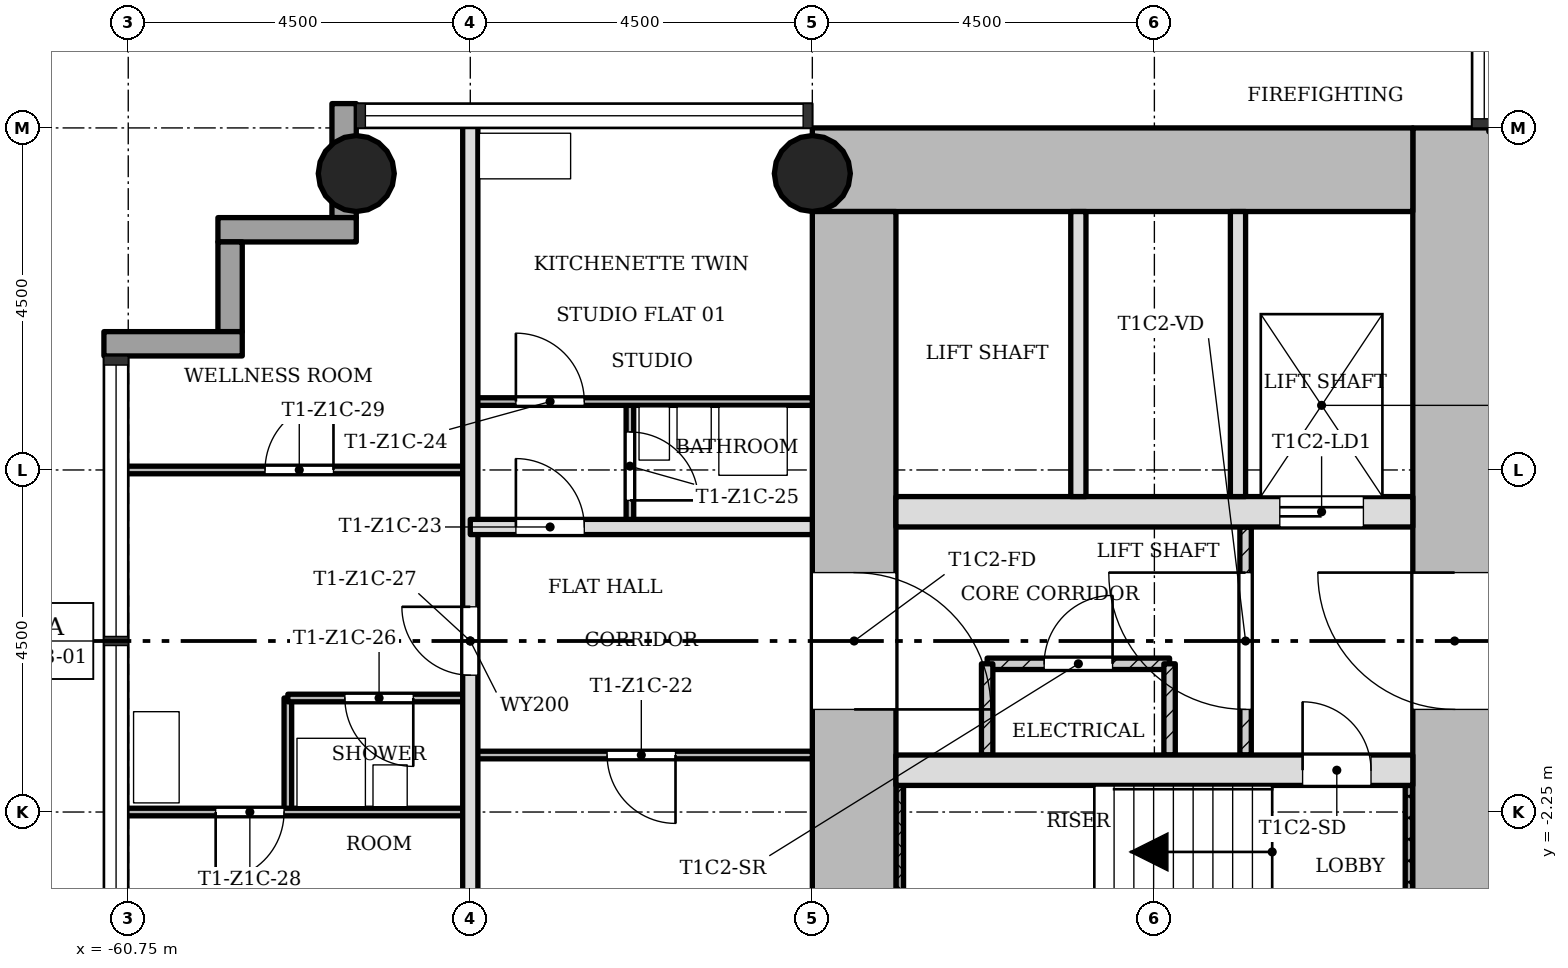
"""IFC4 building model, lengths in metres.
Left out: names, types, materials, properties, quantities, classifications, styles, units other than length and angle.
Written with IfcOpenShell. Run it as: python <this file> out.ifc"""

import sys

from ifc_helpers import new_model, si_unit, direction, frame, frame_2d, origin, origin_2d, place, context, subcontext, project, spatial, rectangle, hollow_circle, extrude, element, fill, save


model = new_model("IFC4")
c1 = context("Model", 3, precision=1e-05, world=origin(), true_north=direction((0.0, 1.0)))
c2 = subcontext(c1, "Body", "Model", "MODEL_VIEW")
j1 = project(units=[si_unit("LENGTHUNIT", "METRE"), si_unit("PLANEANGLEUNIT", "RADIAN")], contexts=[c1])
p1 = place(None, origin())
s1 = spatial("IfcSite", under=j1, at=p1, CompositionType="ELEMENT")
p2 = place(p1, origin())
s2 = spatial("IfcBuilding", under=s1, at=p2, CompositionType="ELEMENT")
p3 = place(p2, frame((0.0, 0.0, 48.3)))
s3 = spatial("IfcBuildingStorey", under=s2, at=p3, CompositionType="ELEMENT", Elevation=48.3)
p4 = place(p3, frame((-43.3, -5.65, 0.0), z_axis=(0.0, 0.0, 1.0), x_axis=(0.0, 1.0, 0.0)))
e1 = element("IfcWall", 1, at=p4, inside=s3, PredefinedType="SHEAR", context=c2, shape_type="SweptSolid", body=[
    extrude(rectangle(XDim=12.4, YDim=1.1, at=frame_2d((6.2, 0.0))), origin(), (0.0, 0.0, 1.0), 3.4),
])
p5 = place(p4, frame((4.75, 0.0, 0.0)))
e2 = element("IfcOpeningElement", 2, at=p5, cuts=e1, PredefinedType="OPENING", context=c2, shape_type="SweptSolid", body=[
    extrude(rectangle(XDim=1.8, YDim=2.1, at=frame_2d((0.9, 1.05))), frame((0.0, 0.56, 0.0), z_axis=(0.0, -1.0, 0.0), x_axis=(1.0, 0.0, 0.0)), (0.0, 0.0, 1.0), 1.12),
])
p6 = place(p3, frame((-43.85, 6.2, 0.0), z_axis=(0.0, 0.0, 1.0), x_axis=(-1.0, 0.0, 0.0)))
e3 = element("IfcWall", 3, at=p6, inside=s3, PredefinedType="SHEAR", context=c2, shape_type="SweptSolid", body=[
    extrude(rectangle(XDim=7.9, YDim=1.1, at=frame_2d((3.95, 0.0))), origin(), (0.0, 0.0, 1.0), 3.4),
])
p7 = place(p3, frame((-51.2, 5.65, 0.0), z_axis=(0.0, 0.0, 1.0), x_axis=(0.0, -1.0, 0.0)))
e4 = element("IfcWall", 4, at=p7, inside=s3, PredefinedType="SHEAR", context=c2, shape_type="SweptSolid", body=[
    extrude(rectangle(XDim=12.4, YDim=1.1, at=frame_2d((6.2, 0.0))), origin(), (0.0, 0.0, 1.0), 3.4),
])
p8 = place(p7, frame((4.75, 0.0, 0.0)))
e5 = element("IfcOpeningElement", 5, at=p8, cuts=e4, PredefinedType="OPENING", context=c2, shape_type="SweptSolid", body=[
    extrude(rectangle(XDim=1.8, YDim=2.1, at=frame_2d((0.9, 1.05))), frame((0.0, 0.56, 0.0), z_axis=(0.0, -1.0, 0.0), x_axis=(1.0, 0.0, 0.0)), (0.0, 0.0, 1.0), 1.12),
])
p9 = place(p3, frame((-50.65, -1.7, 0.0), z_axis=(0.0, 0.0, 1.0), x_axis=(1.0, 0.0, 0.0)))
e6 = element("IfcWall", 6, at=p9, inside=s3, PredefinedType="SHEAR", context=c2, shape_type="SweptSolid", body=[
    extrude(rectangle(XDim=6.8, YDim=0.4, at=frame_2d((3.4, 0.0))), origin(), (0.0, 0.0, 1.0), 3.4),
])
p10 = place(p9, frame((5.35, 0.0, 0.0)))
e7 = element("IfcOpeningElement", 7, at=p10, cuts=e6, PredefinedType="OPENING", context=c2, shape_type="SweptSolid", body=[
    extrude(rectangle(XDim=0.9, YDim=2.1, at=frame_2d((0.45, 1.05))), frame((0.0, 0.21, 0.0), z_axis=(0.0, -1.0, 0.0), x_axis=(1.0, 0.0, 0.0)), (0.0, 0.0, 1.0), 0.42),
])
p11 = place(p3, frame((-50.65, 1.7, 0.0), z_axis=(0.0, 0.0, 1.0), x_axis=(1.0, 0.0, 0.0)))
e8 = element("IfcWall", 8, at=p11, inside=s3, PredefinedType="SHEAR", context=c2, shape_type="SweptSolid", body=[
    extrude(rectangle(XDim=6.8, YDim=0.4, at=frame_2d((3.4, 0.0))), origin(), (0.0, 0.0, 1.0), 3.4),
])
p12 = place(p11, frame((5.05, 0.0, 0.0)))
e9 = element("IfcOpeningElement", 9, at=p12, cuts=e8, PredefinedType="OPENING", context=c2, shape_type="SweptSolid", body=[
    extrude(rectangle(XDim=1.1, YDim=2.1, at=frame_2d((0.55, 1.05))), frame((0.0, 0.21, 0.0), z_axis=(0.0, -1.0, 0.0), x_axis=(1.0, 0.0, 0.0)), (0.0, 0.0, 1.0), 0.42),
])
for number, where, z_axis, x_axis in (
    (10, (-51.75, 6.15, 0.0), (0.0, 0.0, 1.0), (1.0, 0.0, 0.0)),
    (11, (-57.75, 6.15, 0.0), (0.0, 0.0, 1.0), (1.0, 0.0, 0.0)),
):
    element("IfcColumn", number, at=place(p3, frame(where, z_axis=z_axis, x_axis=x_axis)), inside=s3, PredefinedType="COLUMN", context=c2, shape_type="SweptSolid", body=[
        extrude(hollow_circle(Radius=0.5, WallThickness=0.036, at=origin_2d()), origin(), (0.0, 0.0, 1.0), 3.4),
    ])
p13 = place(p3, frame((-57.91, 7.07, -0.3), z_axis=(0.0, 0.0, 1.0), x_axis=(0.0, -1.0, 0.0)))
e12 = element("IfcWall", 12, at=p13, inside=s3, PredefinedType="STANDARD", context=c2, shape_type="SweptSolid", body=[
    extrude(rectangle(XDim=1.5, YDim=0.32, at=frame_2d((0.75, 0.0))), origin(), (0.0, 0.0, 1.0), 3.4),
])
p14 = place(p3, frame((-57.75, 5.41, -0.3), z_axis=(0.0, 0.0, 1.0), x_axis=(-1.0, 0.0, 0.0)))
e13 = element("IfcWall", 13, at=p14, inside=s3, PredefinedType="STANDARD", context=c2, shape_type="SweptSolid", body=[
    extrude(rectangle(XDim=1.82, YDim=0.32, at=frame_2d((0.91, 0.0))), origin(), (0.0, 0.0, 1.0), 3.4),
])
p15 = place(p3, frame((-59.41, 5.25, -0.3), z_axis=(0.0, 0.0, 1.0), x_axis=(0.0, -1.0, 0.0)))
e14 = element("IfcWall", 14, at=p15, inside=s3, PredefinedType="STANDARD", context=c2, shape_type="SweptSolid", body=[
    extrude(rectangle(XDim=1.18, YDim=0.32, at=frame_2d((0.59, 0.0))), origin(), (0.0, 0.0, 1.0), 3.4),
])
p16 = place(p3, frame((-59.25, 3.91, -0.3), z_axis=(0.0, 0.0, 1.0), x_axis=(-1.0, 0.0, 0.0)))
e15 = element("IfcWall", 15, at=p16, inside=s3, PredefinedType="STANDARD", context=c2, shape_type="SweptSolid", body=[
    extrude(rectangle(XDim=1.82, YDim=0.32, at=frame_2d((0.91, 0.0))), origin(), (0.0, 0.0, 1.0), 3.4),
])
p17 = place(p3, frame((-46.05, 1.5, 0.0), z_axis=(0.0, 0.0, 1.0), x_axis=(0.0, -1.0, 0.0)))
e16 = element("IfcWall", 16, at=p17, inside=s3, PredefinedType="PARTITIONING", context=c2, shape_type="SweptSolid", body=[
    extrude(rectangle(XDim=3.0, YDim=0.15, at=frame_2d((1.5, 0.0))), origin(), (0.0, 0.0, 1.0), 3.0),
])
p18 = place(p17, frame((0.6, 0.0, 0.0)))
e17 = element("IfcOpeningElement", 17, at=p18, cuts=e16, PredefinedType="OPENING", context=c2, shape_type="SweptSolid", body=[
    extrude(rectangle(XDim=1.8, YDim=2.1, at=frame_2d((0.9, 1.05))), frame((0.0, 0.085, 0.0), z_axis=(0.0, -1.0, 0.0), x_axis=(1.0, 0.0, 0.0)), (0.0, 0.0, 1.0), 0.17),
])
for number, where, z_axis, x_axis in (
    (18, (-46.15, 5.65, 0.0), (0.0, 0.0, 1.0), (0.0, -1.0, 0.0)),
    (19, (-48.25, 5.65, 0.0), (0.0, 0.0, 1.0), (0.0, -1.0, 0.0)),
):
    element("IfcWall", number, at=place(p3, frame(where, z_axis=z_axis, x_axis=x_axis)), inside=s3, PredefinedType="SOLIDWALL", context=c2, shape_type="SweptSolid", body=[
        extrude(rectangle(XDim=3.75, YDim=0.2, at=frame_2d((1.875, 0.0))), origin(), (0.0, 0.0, 1.0), 3.0),
    ])
p19 = place(p3, frame((-47.05, -0.3, 0.0), z_axis=(0.0, 0.0, 1.0), x_axis=(-1.0, 0.0, 0.0)))
e20 = element("IfcWall", 20, at=p19, inside=s3, PredefinedType="PARTITIONING", context=c2, shape_type="SweptSolid", body=[
    extrude(rectangle(XDim=2.4, YDim=0.15, at=frame_2d((1.2, 0.0))), origin(), (0.0, 0.0, 1.0), 3.0),
])
p20 = place(p19, frame((0.75, 0.0, 0.0)))
e21 = element("IfcOpeningElement", 21, at=p20, cuts=e20, PredefinedType="OPENING", context=c2, shape_type="SweptSolid", body=[
    extrude(rectangle(XDim=0.9, YDim=2.1, at=frame_2d((0.45, 1.05))), frame((0.0, 0.085, 0.0), z_axis=(0.0, -1.0, 0.0), x_axis=(1.0, 0.0, 0.0)), (0.0, 0.0, 1.0), 0.17),
])
for number, where, z_axis, x_axis in (
    (22, (-47.05, -0.3, 0.0), (0.0, 0.0, 1.0), (0.0, -1.0, 0.0)),
    (23, (-49.45, -0.3, 0.0), (0.0, 0.0, 1.0), (0.0, -1.0, 0.0)),
):
    element("IfcWall", number, at=place(p3, frame(where, z_axis=z_axis, x_axis=x_axis)), inside=s3, PredefinedType="PARTITIONING", context=c2, shape_type="SweptSolid", body=[
        extrude(rectangle(XDim=1.2, YDim=0.15, at=frame_2d((0.6, 0.0))), origin(), (0.0, 0.0, 1.0), 3.0),
    ])
p21 = place(p3, frame((-58.65, -2.25, 0.0), z_axis=(0.0, 0.0, 1.0), x_axis=(0.0, 1.0, 0.0)))
e24 = element("IfcWall", 24, at=p21, inside=s3, PredefinedType="PARTITIONING", context=c2, shape_type="SweptSolid", body=[
    extrude(rectangle(XDim=1.5, YDim=0.1, at=frame_2d((0.75, 0.0))), origin(), (0.0, 0.0, 1.0), 3.0),
])
p22 = place(p3, frame((-56.25, -6.85, 0.0), z_axis=(0.0, 0.0, 1.0), x_axis=(0.0, 1.0, 0.0)))
e25 = element("IfcWall", 25, at=p22, inside=s3, PredefinedType="SOLIDWALL", context=c2, shape_type="SweptSolid", body=[
    extrude(rectangle(XDim=13.7, YDim=0.2, at=frame_2d((6.85, 0.0))), origin(), (0.0, 0.0, 1.0), 3.0),
])
p23 = place(p22, frame((6.4, 0.0, 0.0)))
e26 = element("IfcOpeningElement", 26, at=p23, cuts=e25, PredefinedType="OPENING", context=c2, shape_type="SweptSolid", body=[
    extrude(rectangle(XDim=0.9, YDim=2.1, at=frame_2d((0.45, 1.05))), frame((0.0, 0.11, 0.0), z_axis=(0.0, -1.0, 0.0), x_axis=(1.0, 0.0, 0.0)), (0.0, 0.0, 1.0), 0.22),
])
p24 = place(p3, frame((-54.15, 1.5, 0.0), z_axis=(0.0, 0.0, 1.0), x_axis=(0.0, 1.0, 0.0)))
e27 = element("IfcWall", 27, at=p24, inside=s3, PredefinedType="PARTITIONING", context=c2, shape_type="SweptSolid", body=[
    extrude(rectangle(XDim=1.65, YDim=0.1, at=frame_2d((0.825, 0.0))), origin(), (0.0, 0.0, 1.0), 3.0),
])
p25 = place(p24, frame((0.35, 0.0, 0.0)))
e28 = element("IfcOpeningElement", 28, at=p25, cuts=e27, PredefinedType="OPENING", context=c2, shape_type="SweptSolid", body=[
    extrude(rectangle(XDim=0.9, YDim=2.1, at=frame_2d((0.45, 1.05))), frame((0.0, 0.06, 0.0), z_axis=(0.0, -1.0, 0.0), x_axis=(1.0, 0.0, 0.0)), (0.0, 0.0, 1.0), 0.12),
])
p26 = place(p3, frame((-60.85, -2.25, 0.0), z_axis=(0.0, 0.0, 1.0), x_axis=(1.0, 0.0, 0.0)))
e29 = element("IfcWall", 29, at=p26, inside=s3, PredefinedType="PARTITIONING", context=c2, shape_type="SweptSolid", body=[
    extrude(rectangle(XDim=4.6, YDim=0.1, at=frame_2d((2.3, 0.0))), origin(), (0.0, 0.0, 1.0), 3.0),
])
p27 = place(p26, frame((1.25, 0.0, 0.0)))
e30 = element("IfcOpeningElement", 30, at=p27, cuts=e29, PredefinedType="OPENING", context=c2, shape_type="SweptSolid", body=[
    extrude(rectangle(XDim=0.9, YDim=2.1, at=frame_2d((0.45, 1.05))), frame((0.0, 0.06, 0.0), z_axis=(0.0, -1.0, 0.0), x_axis=(1.0, 0.0, 0.0)), (0.0, 0.0, 1.0), 0.12),
])
p28 = place(p3, frame((-56.25, -1.5, 0.0), z_axis=(0.0, 0.0, 1.0), x_axis=(1.0, 0.0, 0.0)))
e31 = element("IfcWall", 31, at=p28, inside=s3, PredefinedType="PARTITIONING", context=c2, shape_type="SweptSolid", body=[
    extrude(rectangle(XDim=4.5, YDim=0.1, at=frame_2d((2.25, 0.0))), origin(), (0.0, 0.0, 1.0), 3.0),
])
p29 = place(p28, frame((1.8, 0.0, 0.0)))
e32 = element("IfcOpeningElement", 32, at=p29, cuts=e31, PredefinedType="OPENING", context=c2, shape_type="SweptSolid", body=[
    extrude(rectangle(XDim=0.9, YDim=2.1, at=frame_2d((0.45, 1.05))), frame((0.0, 0.06, 0.0), z_axis=(0.0, -1.0, 0.0), x_axis=(1.0, 0.0, 0.0)), (0.0, 0.0, 1.0), 0.12),
])
p30 = place(p3, frame((-58.65, -0.75, 0.0), z_axis=(0.0, 0.0, 1.0), x_axis=(1.0, 0.0, 0.0)))
e33 = element("IfcWall", 33, at=p30, inside=s3, PredefinedType="PARTITIONING", context=c2, shape_type="SweptSolid", body=[
    extrude(rectangle(XDim=2.4, YDim=0.1, at=frame_2d((1.2, 0.0))), origin(), (0.0, 0.0, 1.0), 3.0),
])
p31 = place(p30, frame((0.75, 0.0, 0.0)))
e34 = element("IfcOpeningElement", 34, at=p31, cuts=e33, PredefinedType="OPENING", context=c2, shape_type="SweptSolid", body=[
    extrude(rectangle(XDim=0.9, YDim=2.1, at=frame_2d((0.45, 1.05))), frame((0.0, 0.06, 0.0), z_axis=(0.0, -1.0, 0.0), x_axis=(1.0, 0.0, 0.0)), (0.0, 0.0, 1.0), 0.12),
])
p32 = place(p3, frame((-56.25, 1.5, 0.0), z_axis=(0.0, 0.0, 1.0), x_axis=(1.0, 0.0, 0.0)))
e35 = element("IfcWall", 35, at=p32, inside=s3, PredefinedType="SOLIDWALL", context=c2, shape_type="SweptSolid", body=[
    extrude(rectangle(XDim=4.5, YDim=0.2, at=frame_2d((2.25, 0.0))), origin(), (0.0, 0.0, 1.0), 3.0),
])
p33 = place(p32, frame((0.6, 0.0, 0.0)))
e36 = element("IfcOpeningElement", 36, at=p33, cuts=e35, PredefinedType="OPENING", context=c2, shape_type="SweptSolid", body=[
    extrude(rectangle(XDim=0.9, YDim=2.1, at=frame_2d((0.45, 1.05))), frame((0.0, 0.11, 0.0), z_axis=(0.0, -1.0, 0.0), x_axis=(1.0, 0.0, 0.0)), (0.0, 0.0, 1.0), 0.22),
])
p34 = place(p3, frame((-60.85, 2.25, 0.0), z_axis=(0.0, 0.0, 1.0), x_axis=(1.0, 0.0, 0.0)))
e37 = element("IfcWall", 37, at=p34, inside=s3, PredefinedType="PARTITIONING", context=c2, shape_type="SweptSolid", body=[
    extrude(rectangle(XDim=4.6, YDim=0.1, at=frame_2d((2.3, 0.0))), origin(), (0.0, 0.0, 1.0), 3.0),
])
p35 = place(p34, frame((1.9, 0.0, 0.0)))
e38 = element("IfcOpeningElement", 38, at=p35, cuts=e37, PredefinedType="OPENING", context=c2, shape_type="SweptSolid", body=[
    extrude(rectangle(XDim=0.9, YDim=2.1, at=frame_2d((0.45, 1.05))), frame((0.0, 0.06, 0.0), z_axis=(0.0, -1.0, 0.0), x_axis=(1.0, 0.0, 0.0)), (0.0, 0.0, 1.0), 0.12),
])
p36 = place(p3, frame((-56.25, 3.15, 0.0), z_axis=(0.0, 0.0, 1.0), x_axis=(1.0, 0.0, 0.0)))
e39 = element("IfcWall", 39, at=p36, inside=s3, PredefinedType="PARTITIONING", context=c2, shape_type="SweptSolid", body=[
    extrude(rectangle(XDim=4.5, YDim=0.1, at=frame_2d((2.25, 0.0))), origin(), (0.0, 0.0, 1.0), 3.0),
])
p37 = place(p36, frame((0.6, 0.0, 0.0)))
e40 = element("IfcOpeningElement", 40, at=p37, cuts=e39, PredefinedType="OPENING", context=c2, shape_type="SweptSolid", body=[
    extrude(rectangle(XDim=0.9, YDim=2.1, at=frame_2d((0.45, 1.05))), frame((0.0, 0.06, 0.0), z_axis=(0.0, -1.0, 0.0), x_axis=(1.0, 0.0, 0.0)), (0.0, 0.0, 1.0), 0.12),
])
for number, where, z_axis, x_axis in (
    (41, (-50.6, -1.9, 0.0), (0.0, 0.0, 1.0), (0.0, -1.0, 0.0)),
    (42, (-43.9, -1.9, 0.0), (0.0, 0.0, 1.0), (0.0, -1.0, 0.0)),
):
    element("IfcWall", number, at=place(p3, frame(where, z_axis=z_axis, x_axis=x_axis)), inside=s3, PredefinedType="SHEAR", context=c2, shape_type="SweptSolid", body=[
        extrude(rectangle(XDim=3.75, YDim=0.1, at=frame_2d((1.875, 0.0))), origin(), (0.0, 0.0, 1.0), 3.4),
    ])
p38 = place(p18, origin())
e43 = element("IfcDoor", 43, at=p38, inside=s3, OperationType="SINGLE_SWING_LEFT", PredefinedType="DOOR", context=c2, shape_type="SweptSolid", body=[
    extrude(rectangle(XDim=1.8, YDim=2.1, at=frame_2d((0.9, 1.05))), frame((0.0, 0.025, 0.0), z_axis=(0.0, -1.0, 0.0), x_axis=(1.0, 0.0, 0.0)), (0.0, 0.0, 1.0), 0.05),
])
fill(e17, e43)
p39 = place(p20, origin())
e44 = element("IfcDoor", 44, at=p39, inside=s3, OperationType="SINGLE_SWING_LEFT", PredefinedType="DOOR", context=c2, shape_type="SweptSolid", body=[
    extrude(rectangle(XDim=0.9, YDim=2.1, at=frame_2d((0.45, 1.05))), frame((0.0, 0.025, 0.0), z_axis=(0.0, -1.0, 0.0), x_axis=(1.0, 0.0, 0.0)), (0.0, 0.0, 1.0), 0.05),
])
fill(e21, e44)
p40 = place(p29, origin())
e45 = element("IfcDoor", 45, at=p40, inside=s3, OperationType="SINGLE_SWING_RIGHT", PredefinedType="DOOR", context=c2, shape_type="SweptSolid", body=[
    extrude(rectangle(XDim=0.9, YDim=2.1, at=frame_2d((0.45, 1.05))), frame((0.0, 0.025, 0.0), z_axis=(0.0, -1.0, 0.0), x_axis=(1.0, 0.0, 0.0)), (0.0, 0.0, 1.0), 0.05),
])
fill(e32, e45)
p41 = place(p33, origin())
e46 = element("IfcDoor", 46, at=p41, inside=s3, OperationType="SINGLE_SWING_RIGHT", PredefinedType="DOOR", context=c2, shape_type="SweptSolid", body=[
    extrude(rectangle(XDim=0.9, YDim=2.1, at=frame_2d((0.45, 1.05))), frame((0.0, 0.025, 0.0), z_axis=(0.0, -1.0, 0.0), x_axis=(1.0, 0.0, 0.0)), (0.0, 0.0, 1.0), 0.05),
])
fill(e36, e46)
p42 = place(p37, origin())
e47 = element("IfcDoor", 47, at=p42, inside=s3, OperationType="SINGLE_SWING_RIGHT", PredefinedType="DOOR", context=c2, shape_type="SweptSolid", body=[
    extrude(rectangle(XDim=0.9, YDim=2.1, at=frame_2d((0.45, 1.05))), frame((0.0, 0.025, 0.0), z_axis=(0.0, -1.0, 0.0), x_axis=(1.0, 0.0, 0.0)), (0.0, 0.0, 1.0), 0.05),
])
fill(e40, e47)
p43 = place(p25, origin())
e48 = element("IfcDoor", 48, at=p43, inside=s3, OperationType="SINGLE_SWING_LEFT", PredefinedType="DOOR", context=c2, shape_type="SweptSolid", body=[
    extrude(rectangle(XDim=0.9, YDim=2.1, at=frame_2d((0.45, 1.05))), frame((0.0, 0.025, 0.0), z_axis=(0.0, -1.0, 0.0), x_axis=(1.0, 0.0, 0.0)), (0.0, 0.0, 1.0), 0.05),
])
fill(e28, e48)
p44 = place(p31, origin())
e49 = element("IfcDoor", 49, at=p44, inside=s3, OperationType="SINGLE_SWING_RIGHT", PredefinedType="DOOR", context=c2, shape_type="SweptSolid", body=[
    extrude(rectangle(XDim=0.9, YDim=2.1, at=frame_2d((0.45, 1.05))), frame((0.0, 0.025, 0.0), z_axis=(0.0, -1.0, 0.0), x_axis=(1.0, 0.0, 0.0)), (0.0, 0.0, 1.0), 0.05),
])
fill(e34, e49)
p45 = place(p23, origin())
e50 = element("IfcDoor", 50, at=p45, inside=s3, OperationType="SINGLE_SWING_LEFT", PredefinedType="DOOR", context=c2, shape_type="SweptSolid", body=[
    extrude(rectangle(XDim=0.9, YDim=2.1, at=frame_2d((0.45, 1.05))), frame((0.0, 0.025, 0.0), z_axis=(0.0, -1.0, 0.0), x_axis=(1.0, 0.0, 0.0)), (0.0, 0.0, 1.0), 0.05),
])
fill(e26, e50)
p46 = place(p27, origin())
e51 = element("IfcDoor", 51, at=p46, inside=s3, OperationType="SINGLE_SWING_LEFT", PredefinedType="DOOR", context=c2, shape_type="SweptSolid", body=[
    extrude(rectangle(XDim=0.9, YDim=2.1, at=frame_2d((0.45, 1.05))), frame((0.0, 0.025, 0.0), z_axis=(0.0, -1.0, 0.0), x_axis=(1.0, 0.0, 0.0)), (0.0, 0.0, 1.0), 0.05),
])
fill(e30, e51)
p47 = place(p35, origin())
e52 = element("IfcDoor", 52, at=p47, inside=s3, OperationType="SINGLE_SWING_LEFT", PredefinedType="DOOR", context=c2, shape_type="SweptSolid", body=[
    extrude(rectangle(XDim=0.9, YDim=2.1, at=frame_2d((0.45, 1.05))), frame((0.0, 0.025, 0.0), z_axis=(0.0, -1.0, 0.0), x_axis=(1.0, 0.0, 0.0)), (0.0, 0.0, 1.0), 0.05),
])
fill(e38, e52)
p48 = place(p10, origin())
e53 = element("IfcDoor", 53, at=p48, inside=s3, OperationType="SINGLE_SWING_RIGHT", PredefinedType="DOOR", context=c2, shape_type="SweptSolid", body=[
    extrude(rectangle(XDim=0.9, YDim=2.1, at=frame_2d((0.45, 1.05))), frame((0.0, 0.025, 0.0), z_axis=(0.0, -1.0, 0.0), x_axis=(1.0, 0.0, 0.0)), (0.0, 0.0, 1.0), 0.05),
])
fill(e7, e53)
p49 = place(p12, origin())
e54 = element("IfcDoor", 54, at=p49, inside=s3, OperationType="SLIDING_TO_LEFT", PredefinedType="DOOR", context=c2, shape_type="SweptSolid", body=[
    extrude(rectangle(XDim=1.1, YDim=2.1, at=frame_2d((0.55, 1.05))), frame((0.0, 0.025, 0.0), z_axis=(0.0, -1.0, 0.0), x_axis=(1.0, 0.0, 0.0)), (0.0, 0.0, 1.0), 0.05),
])
fill(e9, e54)
p50 = place(p5, origin())
e55 = element("IfcDoor", 55, at=p50, inside=s3, OperationType="SINGLE_SWING_LEFT", PredefinedType="DOOR", context=c2, shape_type="SweptSolid", body=[
    extrude(rectangle(XDim=1.8, YDim=2.1, at=frame_2d((0.9, 1.05))), frame((0.0, 0.025, 0.0), z_axis=(0.0, -1.0, 0.0), x_axis=(1.0, 0.0, 0.0)), (0.0, 0.0, 1.0), 0.05),
])
fill(e2, e55)
p51 = place(p8, origin())
e56 = element("IfcDoor", 56, at=p51, inside=s3, OperationType="SINGLE_SWING_LEFT", PredefinedType="DOOR", context=c2, shape_type="SweptSolid", body=[
    extrude(rectangle(XDim=1.8, YDim=2.1, at=frame_2d((0.9, 1.05))), frame((0.0, 0.025, 0.0), z_axis=(0.0, -1.0, 0.0), x_axis=(1.0, 0.0, 0.0)), (0.0, 0.0, 1.0), 0.05),
])
fill(e5, e56)
save(model, sys.argv[1])
